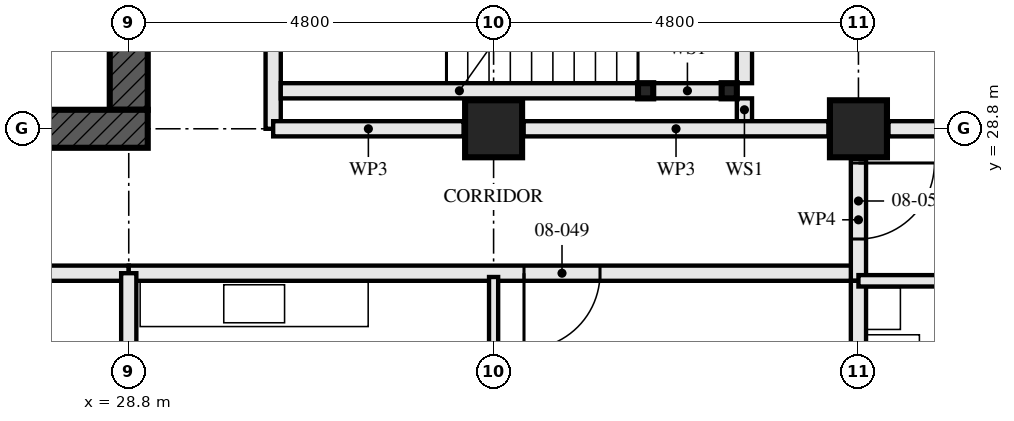
"""IFC4 building model, lengths in metres.
Left out: names, types, materials, properties, quantities, classifications, styles, units other than length and angle.
Written with IfcOpenShell. Run it as: python <this file> out.ifc"""

import sys

from ifc_helpers import new_model, si_unit, direction, frame, frame_2d, origin, origin_2d, place, context, subcontext, project, spatial, rectangle, hollow_rectangle, extrude, element, fill, save


model = new_model("IFC4")
c1 = context("Model", 3, precision=1e-05, world=origin(), true_north=direction((0.0, 1.0)))
c2 = subcontext(c1, "Body", "Model", "MODEL_VIEW")
j1 = project(units=[si_unit("LENGTHUNIT", "METRE"), si_unit("PLANEANGLEUNIT", "RADIAN")], contexts=[c1])
p1 = place(None, origin())
s1 = spatial("IfcSite", under=j1, at=p1, CompositionType="ELEMENT")
p2 = place(p1, origin())
s2 = spatial("IfcBuilding", under=s1, at=p2, CompositionType="ELEMENT")
p3 = place(p2, frame((0.0, 0.0, 34.0)))
s3 = spatial("IfcBuildingStorey", under=s2, at=p3, CompositionType="ELEMENT", Elevation=34.0)
for number, where, z_axis, x_axis in (
    (1, (33.6, 28.8, 0.0), (0.0, 0.0, 1.0), (0.0, 1.0, 0.0)),
    (2, (38.4, 28.8, 0.0), (0.0, 0.0, 1.0), (0.0, 1.0, 0.0)),
):
    element("IfcColumn", number, at=place(p3, frame(where, z_axis=z_axis, x_axis=x_axis)), inside=s3, PredefinedType="COLUMN", context=c2, shape_type="SweptSolid", body=[
        extrude(hollow_rectangle(XDim=0.75, YDim=0.75, WallThickness=0.08, at=origin_2d()), origin(), (0.0, 0.0, 1.0), 3.5),
    ])
p4 = place(p3, frame((14.15, 28.8, -0.17), z_axis=(0.0, 0.0, 1.0), x_axis=(1.0, 0.0, 0.0)))
e3 = element("IfcWall", 3, at=p4, inside=s3, PredefinedType="SHEAR", context=c2, shape_type="SweptSolid", body=[
    extrude(rectangle(XDim=14.9, YDim=0.5, at=frame_2d((7.45, 0.0))), origin(), (0.0, 0.0, 1.0), 3.5),
])
p5 = place(p4, frame((6.85, 0.0, 0.17)))
e4 = element("IfcOpeningElement", 4, at=p5, cuts=e3, PredefinedType="OPENING", context=c2, shape_type="SweptSolid", body=[
    extrude(rectangle(XDim=1.2, YDim=2.1, at=frame_2d((0.6, 1.05))), frame((0.0, 0.26, 0.0), z_axis=(0.0, -1.0, 0.0), x_axis=(1.0, 0.0, 0.0)), (0.0, 0.0, 1.0), 0.521),
])
p6 = place(p3, frame((28.8, 29.05, -0.17), z_axis=(0.0, 0.0, 1.0), x_axis=(0.0, 1.0, 0.0)))
e5 = element("IfcWall", 5, at=p6, inside=s3, PredefinedType="SHEAR", context=c2, shape_type="SweptSolid", body=[
    extrude(rectangle(XDim=13.9, YDim=0.5, at=frame_2d((6.95, 0.0))), origin(), (0.0, 0.0, 1.0), 3.5),
])
p7 = place(p6, frame((6.35, 0.0, 0.17)))
e6 = element("IfcOpeningElement", 6, at=p7, cuts=e5, PredefinedType="OPENING", context=c2, shape_type="SweptSolid", body=[
    extrude(rectangle(XDim=1.2, YDim=2.1, at=frame_2d((0.6, 1.05))), frame((0.0, 0.26, 0.0), z_axis=(0.0, -1.0, 0.0), x_axis=(1.0, 0.0, 0.0)), (0.0, 0.0, 1.0), 0.521),
])
for number, where, z_axis, x_axis in (
    (7, (36.7, 29.3, 0.0), (0.0, 0.0, 1.0), (1.0, 0.0, 0.0)),
    (8, (35.6, 29.3, 0.0), (0.0, 0.0, 1.0), (1.0, 0.0, 0.0)),
):
    element("IfcColumn", number, at=place(p3, frame(where, z_axis=z_axis, x_axis=x_axis)), inside=s3, PredefinedType="COLUMN", context=c2, shape_type="SweptSolid", body=[
        extrude(hollow_rectangle(XDim=0.2, YDim=0.2, WallThickness=0.008, at=origin_2d()), origin(), (0.0, 0.0, 1.0), 3.33),
    ])
p8 = place(p3, frame((14.4, 26.9, 0.0), z_axis=(0.0, 0.0, 1.0), x_axis=(1.0, 0.0, 0.0)))
e9 = element("IfcWall", 9, at=p8, inside=s3, PredefinedType="PARTITIONING", context=c2, shape_type="SweptSolid", body=[
    extrude(rectangle(XDim=14.4, YDim=0.2, at=frame_2d((7.2, 0.0))), origin(), (0.0, 0.0, 1.0), 2.55),
])
p9 = place(p8, frame((1.4, 0.0, 0.0)))
e10 = element("IfcOpeningElement", 10, at=p9, cuts=e9, PredefinedType="OPENING", context=c2, shape_type="SweptSolid", body=[
    extrude(rectangle(XDim=1.0, YDim=2.1, at=frame_2d((0.5, 1.05))), frame((0.0, 0.111, 0.0), z_axis=(0.0, -1.0, 0.0), x_axis=(1.0, 0.0, 0.0)), (0.0, 0.0, 1.0), 0.221),
])
p10 = place(p8, frame((5.2, 0.0, 0.0)))
e11 = element("IfcOpeningElement", 11, at=p10, cuts=e9, PredefinedType="OPENING", context=c2, shape_type="SweptSolid", body=[
    extrude(rectangle(XDim=1.0, YDim=2.1, at=frame_2d((0.5, 1.05))), frame((0.0, 0.111, 0.0), z_axis=(0.0, -1.0, 0.0), x_axis=(1.0, 0.0, 0.0)), (0.0, 0.0, 1.0), 0.221),
])
p11 = place(p8, frame((10.0, 0.0, 0.0)))
e12 = element("IfcOpeningElement", 12, at=p11, cuts=e9, PredefinedType="OPENING", context=c2, shape_type="SweptSolid", body=[
    extrude(rectangle(XDim=1.0, YDim=2.1, at=frame_2d((0.5, 1.05))), frame((0.0, 0.111, 0.0), z_axis=(0.0, -1.0, 0.0), x_axis=(1.0, 0.0, 0.0)), (0.0, 0.0, 1.0), 0.221),
])
p12 = place(p3, frame((33.6, 20.1, 0.0), z_axis=(0.0, 0.0, 1.0), x_axis=(0.0, 1.0, 0.0)))
e13 = element("IfcWall", 13, at=p12, inside=s3, PredefinedType="PARTITIONING", context=c2, shape_type="SweptSolid", body=[
    extrude(rectangle(XDim=6.75, YDim=0.12, at=frame_2d((3.375, 0.0))), origin(), (0.0, 0.0, 1.0), 2.55),
])
p13 = place(p12, frame((2.925, 0.0, 0.0)))
e14 = element("IfcOpeningElement", 14, at=p13, cuts=e13, PredefinedType="OPENING", context=c2, shape_type="SweptSolid", body=[
    extrude(rectangle(XDim=0.9, YDim=2.1, at=frame_2d((0.45, 1.05))), frame((0.0, 0.071, 0.0), z_axis=(0.0, -1.0, 0.0), x_axis=(1.0, 0.0, 0.0)), (0.0, 0.0, 1.0), 0.141),
])
p14 = place(p3, frame((38.4, 19.52, 0.0), z_axis=(0.0, 0.0, 1.0), x_axis=(0.0, 1.0, 0.0)))
e15 = element("IfcWall", 15, at=p14, inside=s3, PredefinedType="PARTITIONING", context=c2, shape_type="SweptSolid", body=[
    extrude(rectangle(XDim=7.28, YDim=0.2, at=frame_2d((3.64, 0.0))), origin(), (0.0, 0.0, 1.0), 2.55),
])
p15 = place(p3, frame((38.4, 26.8, 0.0), z_axis=(0.0, 0.0, 1.0), x_axis=(1.0, 0.0, 0.0)))
e16 = element("IfcWall", 16, at=p15, inside=s3, PredefinedType="PARTITIONING", context=c2, shape_type="SweptSolid", body=[
    extrude(rectangle(XDim=2.8, YDim=0.15, at=frame_2d((1.4, 0.0))), origin(), (0.0, 0.0, 1.0), 3.33),
])
p16 = place(p3, frame((28.8, 26.9, 0.0), z_axis=(0.0, 0.0, 1.0), x_axis=(1.0, 0.0, 0.0)))
e17 = element("IfcWall", 17, at=p16, inside=s3, PredefinedType="PARTITIONING", context=c2, shape_type="SweptSolid", body=[
    extrude(rectangle(XDim=9.6, YDim=0.2, at=frame_2d((4.8, 0.0))), origin(), (0.0, 0.0, 1.0), 3.33),
])
p17 = place(p16, frame((5.2, 0.0, 0.0)))
e18 = element("IfcOpeningElement", 18, at=p17, cuts=e17, PredefinedType="OPENING", context=c2, shape_type="SweptSolid", body=[
    extrude(rectangle(XDim=1.0, YDim=2.1, at=frame_2d((0.5, 1.05))), frame((0.0, 0.111, 0.0), z_axis=(0.0, -1.0, 0.0), x_axis=(1.0, 0.0, 0.0)), (0.0, 0.0, 1.0), 0.221),
])
p18 = place(p3, frame((38.4, 26.8, 0.0), z_axis=(0.0, 0.0, 1.0), x_axis=(0.0, 1.0, 0.0)))
e19 = element("IfcWall", 19, at=p18, inside=s3, PredefinedType="PARTITIONING", context=c2, shape_type="SweptSolid", body=[
    extrude(rectangle(XDim=1.605, YDim=0.2, at=frame_2d((0.802, 0.0))), origin(), (0.0, 0.0, 1.0), 3.33),
])
p19 = place(p18, frame((0.55, 0.0, 0.0)))
e20 = element("IfcOpeningElement", 20, at=p19, cuts=e19, PredefinedType="OPENING", context=c2, shape_type="SweptSolid", body=[
    extrude(rectangle(XDim=1.0, YDim=2.1, at=frame_2d((0.5, 1.05))), frame((0.0, 0.111, 0.0), z_axis=(0.0, -1.0, 0.0), x_axis=(1.0, 0.0, 0.0)), (0.0, 0.0, 1.0), 0.221),
])
p20 = place(p3, frame((36.6, 29.3, 0.0), z_axis=(0.0, 0.0, 1.0), x_axis=(-1.0, 0.0, 0.0)))
e21 = element("IfcWall", 21, at=p20, inside=s3, PredefinedType="SOLIDWALL", context=c2, shape_type="SweptSolid", body=[
    extrude(rectangle(XDim=0.9, YDim=0.2, at=frame_2d((0.45, 0.0))), origin(), (0.0, 0.0, 1.0), 2.99),
])
p21 = place(p3, frame((35.5, 29.3, 0.0), z_axis=(0.0, 0.0, 1.0), x_axis=(-1.0, 0.0, 0.0)))
e22 = element("IfcWall", 22, at=p21, inside=s3, PredefinedType="SOLIDWALL", context=c2, shape_type="SweptSolid", body=[
    extrude(rectangle(XDim=4.7, YDim=0.2, at=frame_2d((2.35, 0.0))), origin(), (0.0, 0.0, 1.0), 2.99),
])
p22 = place(p3, frame((36.9, 28.9, 0.0), z_axis=(0.0, 0.0, 1.0), x_axis=(0.0, 1.0, 0.0)))
e23 = element("IfcWall", 23, at=p22, inside=s3, PredefinedType="SOLIDWALL", context=c2, shape_type="SweptSolid", body=[
    extrude(rectangle(XDim=0.3, YDim=0.2, at=frame_2d((0.15, 0.0))), origin(), (0.0, 0.0, 1.0), 3.33),
])
p23 = place(p3, frame((36.9, 29.4, 0.0), z_axis=(0.0, 0.0, 1.0), x_axis=(0.0, 1.0, 0.0)))
e24 = element("IfcWall", 24, at=p23, inside=s3, PredefinedType="SOLIDWALL", context=c2, shape_type="SweptSolid", body=[
    extrude(rectangle(XDim=2.6, YDim=0.2, at=frame_2d((1.3, 0.0))), origin(), (0.0, 0.0, 1.0), 3.33),
])
p24 = place(p3, frame((30.7, 28.8, 0.0), z_axis=(0.0, 0.0, 1.0), x_axis=(0.0, 1.0, 0.0)))
e25 = element("IfcWall", 25, at=p24, inside=s3, PredefinedType="PARTITIONING", context=c2, shape_type="SweptSolid", body=[
    extrude(rectangle(XDim=14.4, YDim=0.2, at=frame_2d((7.2, 0.0))), origin(), (0.0, 0.0, 1.0), 2.55),
])
p25 = place(p24, frame((1.4, 0.0, 0.0)))
e26 = element("IfcOpeningElement", 26, at=p25, cuts=e25, PredefinedType="OPENING", context=c2, shape_type="SweptSolid", body=[
    extrude(rectangle(XDim=1.0, YDim=2.1, at=frame_2d((0.5, 1.05))), frame((0.0, 0.111, 0.0), z_axis=(0.0, -1.0, 0.0), x_axis=(1.0, 0.0, 0.0)), (0.0, 0.0, 1.0), 0.221),
])
p26 = place(p24, frame((4.1, 0.0, 0.0)))
e27 = element("IfcOpeningElement", 27, at=p26, cuts=e25, PredefinedType="OPENING", context=c2, shape_type="SweptSolid", body=[
    extrude(rectangle(XDim=1.0, YDim=2.1, at=frame_2d((0.5, 1.05))), frame((0.0, 0.111, 0.0), z_axis=(0.0, -1.0, 0.0), x_axis=(1.0, 0.0, 0.0)), (0.0, 0.0, 1.0), 0.221),
])
p27 = place(p24, frame((5.975, 0.0, 0.0)))
e28 = element("IfcOpeningElement", 28, at=p27, cuts=e25, PredefinedType="OPENING", context=c2, shape_type="SweptSolid", body=[
    extrude(rectangle(XDim=1.0, YDim=2.1, at=frame_2d((0.5, 1.05))), frame((0.0, 0.111, 0.0), z_axis=(0.0, -1.0, 0.0), x_axis=(1.0, 0.0, 0.0)), (0.0, 0.0, 1.0), 0.221),
])
p28 = place(p24, frame((10.0, 0.0, 0.0)))
e29 = element("IfcOpeningElement", 29, at=p28, cuts=e25, PredefinedType="OPENING", context=c2, shape_type="SweptSolid", body=[
    extrude(rectangle(XDim=1.0, YDim=2.1, at=frame_2d((0.5, 1.05))), frame((0.0, 0.111, 0.0), z_axis=(0.0, -1.0, 0.0), x_axis=(1.0, 0.0, 0.0)), (0.0, 0.0, 1.0), 0.221),
])
p29 = place(p3, frame((28.8, 24.395, 0.0), z_axis=(0.0, 0.0, 1.0), x_axis=(0.0, 1.0, 0.0)))
e30 = element("IfcWall", 30, at=p29, inside=s3, PredefinedType="PARTITIONING", context=c2, shape_type="SweptSolid", body=[
    extrude(rectangle(XDim=2.505, YDim=0.2, at=frame_2d((1.252, 0.0))), origin(), (0.0, 0.0, 1.0), 2.32),
])
p30 = place(p3, frame((42.88, 28.8, 0.0), z_axis=(0.0, 0.0, 1.0), x_axis=(-1.0, 0.0, 0.0)))
e31 = element("IfcWall", 31, at=p30, inside=s3, PredefinedType="PARTITIONING", context=c2, shape_type="SweptSolid", body=[
    extrude(rectangle(XDim=4.085, YDim=0.2, at=frame_2d((2.042, 0.0))), origin(), (0.0, 0.0, 1.0), 2.32),
])
p31 = place(p3, frame((38.005, 28.8, 0.0), z_axis=(0.0, 0.0, 1.0), x_axis=(-1.0, 0.0, 0.0)))
e32 = element("IfcWall", 32, at=p31, inside=s3, PredefinedType="PARTITIONING", context=c2, shape_type="SweptSolid", body=[
    extrude(rectangle(XDim=4.01, YDim=0.2, at=frame_2d((2.005, 0.0))), origin(), (0.0, 0.0, 1.0), 2.32),
])
p32 = place(p3, frame((33.205, 28.8, 0.0), z_axis=(0.0, 0.0, 1.0), x_axis=(-1.0, 0.0, 0.0)))
e33 = element("IfcWall", 33, at=p32, inside=s3, PredefinedType="PARTITIONING", context=c2, shape_type="SweptSolid", body=[
    extrude(rectangle(XDim=2.505, YDim=0.2, at=frame_2d((1.252, 0.0))), origin(), (0.0, 0.0, 1.0), 2.32),
])
p33 = place(p17, frame((1.0, 0.0, 0.0), z_axis=(0.0, 0.0, 1.0), x_axis=(-1.0, 0.0, 0.0)))
e34 = element("IfcDoor", 34, at=p33, inside=s3, OperationType="SINGLE_SWING_LEFT", PredefinedType="DOOR", context=c2, shape_type="SweptSolid", body=[
    extrude(rectangle(XDim=1.0, YDim=2.1, at=frame_2d((0.5, 1.05))), frame((0.0, 0.027, 0.0), z_axis=(0.0, -1.0, 0.0), x_axis=(1.0, 0.0, 0.0)), (0.0, 0.0, 1.0), 0.054),
])
fill(e18, e34)
p34 = place(p19, frame((1.0, 0.0, 0.0), z_axis=(0.0, 0.0, 1.0), x_axis=(-1.0, 0.0, 0.0)))
e35 = element("IfcDoor", 35, at=p34, inside=s3, OperationType="SINGLE_SWING_RIGHT", PredefinedType="DOOR", context=c2, shape_type="SweptSolid", body=[
    extrude(rectangle(XDim=1.0, YDim=2.1, at=frame_2d((0.5, 1.05))), frame((0.0, 0.027, 0.0), z_axis=(0.0, -1.0, 0.0), x_axis=(1.0, 0.0, 0.0)), (0.0, 0.0, 1.0), 0.054),
])
fill(e20, e35)
save(model, sys.argv[1])
